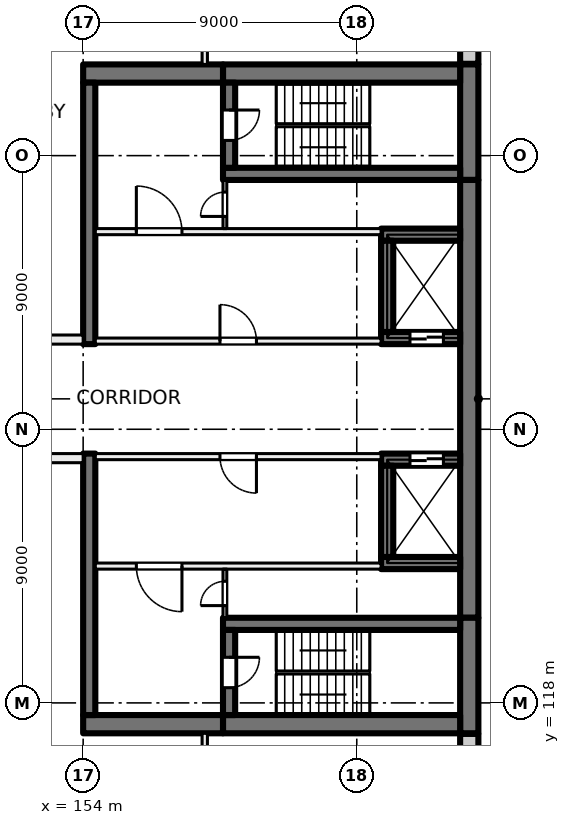
"""IFC4 building model, lengths in metres.
Left out: names, types, materials, properties, quantities, classifications, styles, units other than length and angle.
Written with IfcOpenShell. Run it as: python <this file> out.ifc"""

import sys

from ifc_helpers import new_model, si_unit, direction, frame, frame_2d, origin, place, context, subcontext, project, spatial, rectangle, extrude, element, fill, save


model = new_model("IFC4")
c1 = context("Model", 3, precision=1e-05, world=origin(), true_north=direction((0.0, 1.0)))
c2 = subcontext(c1, "Body", "Model", "MODEL_VIEW")
j1 = project(units=[si_unit("LENGTHUNIT", "METRE"), si_unit("PLANEANGLEUNIT", "RADIAN")], contexts=[c1])
p1 = place(None, origin())
s1 = spatial("IfcSite", under=j1, at=p1, CompositionType="ELEMENT")
p2 = place(p1, origin())
s2 = spatial("IfcBuilding", under=s1, at=p2, CompositionType="ELEMENT")
p3 = place(p2, frame((0.0, 0.0, 63.5)))
s3 = spatial("IfcBuildingStorey", under=s2, at=p3, CompositionType="ELEMENT", Elevation=63.5)
p4 = place(p3, frame((166.7, 139.0, 0.0), z_axis=(0.0, 0.0, 1.0), x_axis=(0.0, -1.0, 0.0)))
e1 = element("IfcWall", 1, at=p4, inside=s3, PredefinedType="SHEAR", context=c2, shape_type="SweptSolid", body=[
    extrude(rectangle(XDim=3.8, YDim=0.6, at=frame_2d((1.9, 0.0))), origin(), (0.0, 0.0, 1.0), 4.0),
])
p5 = place(p3, frame((166.7, 135.2, 0.0), z_axis=(0.0, 0.0, 1.0), x_axis=(0.0, -1.0, 0.0)))
e2 = element("IfcWall", 2, at=p5, inside=s3, PredefinedType="SHEAR", context=c2, shape_type="SweptSolid", body=[
    extrude(rectangle(XDim=14.4, YDim=0.6, at=frame_2d((7.2, 0.0))), origin(), (0.0, 0.0, 1.0), 4.0),
])
p6 = place(p3, frame((166.7, 120.8, 0.0), z_axis=(0.0, 0.0, 1.0), x_axis=(0.0, -1.0, 0.0)))
e3 = element("IfcWall", 3, at=p6, inside=s3, PredefinedType="SHEAR", context=c2, shape_type="SweptSolid", body=[
    extrude(rectangle(XDim=3.8, YDim=0.6, at=frame_2d((1.9, 0.0))), origin(), (0.0, 0.0, 1.0), 4.0),
])
for number, where, z_axis, x_axis in (
    (4, (166.4, 138.7, 0.0), (0.0, 0.0, 1.0), (-1.0, 0.0, 0.0)),
    (5, (166.4, 117.3, 0.0), (0.0, 0.0, 1.0), (-1.0, 0.0, 0.0)),
):
    element("IfcWall", number, at=place(p3, frame(where, z_axis=z_axis, x_axis=x_axis)), inside=s3, PredefinedType="SHEAR", context=c2, shape_type="SweptSolid", body=[
        extrude(rectangle(XDim=7.8, YDim=0.6, at=frame_2d((3.9, 0.0))), origin(), (0.0, 0.0, 1.0), 4.0),
    ])
for number, where, z_axis, x_axis in (
    (6, (158.6, 138.7, 0.0), (0.0, 0.0, 1.0), (-1.0, 0.0, 0.0)),
    (7, (158.6, 117.3, 0.0), (0.0, 0.0, 1.0), (-1.0, 0.0, 0.0)),
):
    element("IfcWall", number, at=place(p3, frame(where, z_axis=z_axis, x_axis=x_axis)), inside=s3, PredefinedType="SHEAR", context=c2, shape_type="SweptSolid", body=[
        extrude(rectangle(XDim=4.6, YDim=0.6, at=frame_2d((2.3, 0.0))), origin(), (0.0, 0.0, 1.0), 4.0),
    ])
p7 = place(p3, frame((166.4, 135.4, 0.0), z_axis=(0.0, 0.0, 1.0), x_axis=(-1.0, 0.0, 0.0)))
e8 = element("IfcWall", 8, at=p7, inside=s3, PredefinedType="SHEAR", context=c2, shape_type="SweptSolid", body=[
    extrude(rectangle(XDim=7.8, YDim=0.4, at=frame_2d((3.9, 0.0))), origin(), (0.0, 0.0, 1.0), 4.0),
])
p8 = place(p3, frame((158.8, 138.4, 0.0), z_axis=(0.0, 0.0, 1.0), x_axis=(0.0, -1.0, 0.0)))
e9 = element("IfcWall", 9, at=p8, inside=s3, PredefinedType="SHEAR", context=c2, shape_type="SweptSolid", body=[
    extrude(rectangle(XDim=2.8, YDim=0.4, at=frame_2d((1.4, 0.0))), origin(), (0.0, 0.0, 1.0), 4.0),
])
p9 = place(p8, frame((0.9, 0.0, 0.0)))
e10 = element("IfcOpeningElement", 10, at=p9, cuts=e9, PredefinedType="OPENING", context=c2, shape_type="SweptSolid", body=[
    extrude(rectangle(XDim=1.0, YDim=2.1, at=frame_2d((0.5, 1.05))), frame((0.0, 0.21, 0.0), z_axis=(0.0, -1.0, 0.0), x_axis=(1.0, 0.0, 0.0)), (0.0, 0.0, 1.0), 0.42),
])
p10 = place(p3, frame((166.4, 120.6, 0.0), z_axis=(0.0, 0.0, 1.0), x_axis=(-1.0, 0.0, 0.0)))
e11 = element("IfcWall", 11, at=p10, inside=s3, PredefinedType="SHEAR", context=c2, shape_type="SweptSolid", body=[
    extrude(rectangle(XDim=7.8, YDim=0.4, at=frame_2d((3.9, 0.0))), origin(), (0.0, 0.0, 1.0), 4.0),
])
p11 = place(p3, frame((158.8, 120.4, 0.0), z_axis=(0.0, 0.0, 1.0), x_axis=(0.0, -1.0, 0.0)))
e12 = element("IfcWall", 12, at=p11, inside=s3, PredefinedType="SHEAR", context=c2, shape_type="SweptSolid", body=[
    extrude(rectangle(XDim=2.8, YDim=0.4, at=frame_2d((1.4, 0.0))), origin(), (0.0, 0.0, 1.0), 4.0),
])
p12 = place(p11, frame((0.9, 0.0, 0.0)))
e13 = element("IfcOpeningElement", 13, at=p12, cuts=e12, PredefinedType="OPENING", context=c2, shape_type="SweptSolid", body=[
    extrude(rectangle(XDim=1.0, YDim=2.1, at=frame_2d((0.5, 1.05))), frame((0.0, 0.21, 0.0), z_axis=(0.0, -1.0, 0.0), x_axis=(1.0, 0.0, 0.0)), (0.0, 0.0, 1.0), 0.42),
])
p13 = place(p3, frame((166.4, 130.0, 0.0), z_axis=(0.0, 0.0, 1.0), x_axis=(-1.0, 0.0, 0.0)))
e14 = element("IfcWall", 14, at=p13, inside=s3, PredefinedType="SHEAR", context=c2, shape_type="SweptSolid", body=[
    extrude(rectangle(XDim=2.6, YDim=0.4, at=frame_2d((1.3, 0.0))), origin(), (0.0, 0.0, 1.0), 4.0),
])
p14 = place(p13, frame((0.55, 0.0, 0.0)))
e15 = element("IfcOpeningElement", 15, at=p14, cuts=e14, PredefinedType="OPENING", context=c2, shape_type="SweptSolid", body=[
    extrude(rectangle(XDim=1.1, YDim=2.1, at=frame_2d((0.55, 1.05))), frame((0.0, 0.21, 0.0), z_axis=(0.0, -1.0, 0.0), x_axis=(1.0, 0.0, 0.0)), (0.0, 0.0, 1.0), 0.42),
])
p15 = place(p3, frame((166.4, 133.4, 0.0), z_axis=(0.0, 0.0, 1.0), x_axis=(-1.0, 0.0, 0.0)))
e16 = element("IfcWall", 16, at=p15, inside=s3, PredefinedType="SHEAR", context=c2, shape_type="SweptSolid", body=[
    extrude(rectangle(XDim=2.6, YDim=0.4, at=frame_2d((1.3, 0.0))), origin(), (0.0, 0.0, 1.0), 4.0),
])
p16 = place(p3, frame((164.0, 133.2, 0.0), z_axis=(0.0, 0.0, 1.0), x_axis=(0.0, -1.0, 0.0)))
e17 = element("IfcWall", 17, at=p16, inside=s3, PredefinedType="SHEAR", context=c2, shape_type="SweptSolid", body=[
    extrude(rectangle(XDim=3.0, YDim=0.4, at=frame_2d((1.5, 0.0))), origin(), (0.0, 0.0, 1.0), 4.0),
])
p17 = place(p3, frame((166.4, 126.0, 0.0), z_axis=(0.0, 0.0, 1.0), x_axis=(-1.0, 0.0, 0.0)))
e18 = element("IfcWall", 18, at=p17, inside=s3, PredefinedType="SHEAR", context=c2, shape_type="SweptSolid", body=[
    extrude(rectangle(XDim=2.6, YDim=0.4, at=frame_2d((1.3, 0.0))), origin(), (0.0, 0.0, 1.0), 4.0),
])
p18 = place(p17, frame((0.55, 0.0, 0.0)))
e19 = element("IfcOpeningElement", 19, at=p18, cuts=e18, PredefinedType="OPENING", context=c2, shape_type="SweptSolid", body=[
    extrude(rectangle(XDim=1.1, YDim=2.1, at=frame_2d((0.55, 1.05))), frame((0.0, 0.21, 0.0), z_axis=(0.0, -1.0, 0.0), x_axis=(1.0, 0.0, 0.0)), (0.0, 0.0, 1.0), 0.42),
])
p19 = place(p3, frame((166.4, 122.6, 0.0), z_axis=(0.0, 0.0, 1.0), x_axis=(-1.0, 0.0, 0.0)))
e20 = element("IfcWall", 20, at=p19, inside=s3, PredefinedType="SHEAR", context=c2, shape_type="SweptSolid", body=[
    extrude(rectangle(XDim=2.6, YDim=0.4, at=frame_2d((1.3, 0.0))), origin(), (0.0, 0.0, 1.0), 4.0),
])
p20 = place(p3, frame((164.0, 125.8, 0.0), z_axis=(0.0, 0.0, 1.0), x_axis=(0.0, -1.0, 0.0)))
e21 = element("IfcWall", 21, at=p20, inside=s3, PredefinedType="SHEAR", context=c2, shape_type="SweptSolid", body=[
    extrude(rectangle(XDim=3.0, YDim=0.4, at=frame_2d((1.5, 0.0))), origin(), (0.0, 0.0, 1.0), 4.0),
])
for number, where, z_axis, x_axis in (
    (22, (154.2, 138.4, 0.0), (0.0, 0.0, 1.0), (0.0, -1.0, 0.0)),
    (23, (154.2, 126.2, 0.0), (0.0, 0.0, 1.0), (0.0, -1.0, 0.0)),
):
    element("IfcWall", number, at=place(p3, frame(where, z_axis=z_axis, x_axis=x_axis)), inside=s3, PredefinedType="SHEAR", context=c2, shape_type="SweptSolid", body=[
        extrude(rectangle(XDim=8.6, YDim=0.4, at=frame_2d((4.3, 0.0))), origin(), (0.0, 0.0, 1.0), 4.0),
    ])
p21 = place(p3, frame((166.7, 116.98, 0.0), z_axis=(0.0, 0.0, 1.0), x_axis=(0.0, -1.0, 0.0)))
e24 = element("IfcWall", 24, at=p21, inside=s3, PredefinedType="SOLIDWALL", context=c2, shape_type="SweptSolid", body=[
    extrude(rectangle(XDim=2.98, YDim=0.6, at=frame_2d((1.49, 0.0))), origin(), (0.0, 0.0, 1.0), 3.625),
])
p22 = place(p3, frame((166.7, 141.93, 0.0), z_axis=(0.0, 0.0, 1.0), x_axis=(0.0, -1.0, 0.0)))
e25 = element("IfcWall", 25, at=p22, inside=s3, PredefinedType="SOLIDWALL", context=c2, shape_type="SweptSolid", body=[
    extrude(rectangle(XDim=2.91, YDim=0.6, at=frame_2d((1.455, 0.0))), origin(), (0.0, 0.0, 1.0), 3.625),
])
p23 = place(p3, frame((163.8, 126.1, 0.0), z_axis=(0.0, 0.0, 1.0), x_axis=(-1.0, 0.0, 0.0)))
e26 = element("IfcWall", 26, at=p23, inside=s3, PredefinedType="PARTITIONING", context=c2, shape_type="SweptSolid", body=[
    extrude(rectangle(XDim=9.4, YDim=0.2, at=frame_2d((4.7, 0.0))), origin(), (0.0, 0.0, 1.0), 3.625),
])
p24 = place(p23, frame((4.1, 0.0, 0.0)))
e27 = element("IfcOpeningElement", 27, at=p24, cuts=e26, PredefinedType="OPENING", context=c2, shape_type="SweptSolid", body=[
    extrude(rectangle(XDim=1.2, YDim=2.1, at=frame_2d((0.6, 1.05))), frame((0.0, 0.11, 0.0), z_axis=(0.0, -1.0, 0.0), x_axis=(1.0, 0.0, 0.0)), (0.0, 0.0, 1.0), 0.22),
])
p25 = place(p3, frame((163.8, 122.5, 0.0), z_axis=(0.0, 0.0, 1.0), x_axis=(-1.0, 0.0, 0.0)))
e28 = element("IfcWall", 28, at=p25, inside=s3, PredefinedType="PARTITIONING", context=c2, shape_type="SweptSolid", body=[
    extrude(rectangle(XDim=9.4, YDim=0.2, at=frame_2d((4.7, 0.0))), origin(), (0.0, 0.0, 1.0), 3.625),
])
p26 = place(p25, frame((6.55, 0.0, 0.0)))
e29 = element("IfcOpeningElement", 29, at=p26, cuts=e28, PredefinedType="OPENING", context=c2, shape_type="SweptSolid", body=[
    extrude(rectangle(XDim=1.5, YDim=2.1, at=frame_2d((0.75, 1.05))), frame((0.0, 0.11, 0.0), z_axis=(0.0, -1.0, 0.0), x_axis=(1.0, 0.0, 0.0)), (0.0, 0.0, 1.0), 0.22),
])
p27 = place(p3, frame((158.663, 120.8, 0.0), z_axis=(0.0, 0.0, 1.0), x_axis=(0.0, 1.0, 0.0)))
e30 = element("IfcWall", 30, at=p27, inside=s3, PredefinedType="PARTITIONING", context=c2, shape_type="SweptSolid", body=[
    extrude(rectangle(XDim=1.6, YDim=0.125, at=frame_2d((0.8, 0.0))), origin(), (0.0, 0.0, 1.0), 3.625),
])
p28 = place(p27, frame((0.4, 0.0, 0.0)))
e31 = element("IfcOpeningElement", 31, at=p28, cuts=e30, PredefinedType="OPENING", context=c2, shape_type="SweptSolid", body=[
    extrude(rectangle(XDim=0.8, YDim=2.1, at=frame_2d((0.4, 1.05))), frame((0.0, 0.073, 0.0), z_axis=(0.0, -1.0, 0.0), x_axis=(1.0, 0.0, 0.0)), (0.0, 0.0, 1.0), 0.145),
])
p29 = place(p3, frame((154.4, 129.9, 0.0), z_axis=(0.0, 0.0, 1.0), x_axis=(1.0, 0.0, 0.0)))
e32 = element("IfcWall", 32, at=p29, inside=s3, PredefinedType="PARTITIONING", context=c2, shape_type="SweptSolid", body=[
    extrude(rectangle(XDim=9.4, YDim=0.2, at=frame_2d((4.7, 0.0))), origin(), (0.0, 0.0, 1.0), 3.625),
])
p30 = place(p29, frame((4.1, 0.0, 0.0)))
e33 = element("IfcOpeningElement", 33, at=p30, cuts=e32, PredefinedType="OPENING", context=c2, shape_type="SweptSolid", body=[
    extrude(rectangle(XDim=1.2, YDim=2.1, at=frame_2d((0.6, 1.05))), frame((0.0, 0.11, 0.0), z_axis=(0.0, -1.0, 0.0), x_axis=(1.0, 0.0, 0.0)), (0.0, 0.0, 1.0), 0.22),
])
p31 = place(p3, frame((154.4, 133.5, 0.0), z_axis=(0.0, 0.0, 1.0), x_axis=(1.0, 0.0, 0.0)))
e34 = element("IfcWall", 34, at=p31, inside=s3, PredefinedType="PARTITIONING", context=c2, shape_type="SweptSolid", body=[
    extrude(rectangle(XDim=9.4, YDim=0.2, at=frame_2d((4.7, 0.0))), origin(), (0.0, 0.0, 1.0), 3.625),
])
p32 = place(p31, frame((1.35, 0.0, 0.0)))
e35 = element("IfcOpeningElement", 35, at=p32, cuts=e34, PredefinedType="OPENING", context=c2, shape_type="SweptSolid", body=[
    extrude(rectangle(XDim=1.5, YDim=2.1, at=frame_2d((0.75, 1.05))), frame((0.0, 0.11, 0.0), z_axis=(0.0, -1.0, 0.0), x_axis=(1.0, 0.0, 0.0)), (0.0, 0.0, 1.0), 0.22),
])
p33 = place(p3, frame((158.663, 133.6, 0.0), z_axis=(0.0, 0.0, 1.0), x_axis=(0.0, 1.0, 0.0)))
e36 = element("IfcWall", 36, at=p33, inside=s3, PredefinedType="PARTITIONING", context=c2, shape_type="SweptSolid", body=[
    extrude(rectangle(XDim=1.6, YDim=0.125, at=frame_2d((0.8, 0.0))), origin(), (0.0, 0.0, 1.0), 3.625),
])
p34 = place(p33, frame((0.4, 0.0, 0.0)))
e37 = element("IfcOpeningElement", 37, at=p34, cuts=e36, PredefinedType="OPENING", context=c2, shape_type="SweptSolid", body=[
    extrude(rectangle(XDim=0.8, YDim=2.1, at=frame_2d((0.4, 1.05))), frame((0.0, 0.073, 0.0), z_axis=(0.0, -1.0, 0.0), x_axis=(1.0, 0.0, 0.0)), (0.0, 0.0, 1.0), 0.145),
])
p35 = place(p3, frame((140.0, 129.95, 0.0), z_axis=(0.0, 0.0, 1.0), x_axis=(1.0, 0.0, 0.0)))
e38 = element("IfcWall", 38, at=p35, inside=s3, PredefinedType="PARTITIONING", context=c2, shape_type="SweptSolid", body=[
    extrude(rectangle(XDim=14.0, YDim=0.3, at=frame_2d((7.0, 0.0))), origin(), (0.0, 0.0, 1.0), 3.625),
])
p36 = place(p35, frame((5.25, 0.0, 0.0)))
e39 = element("IfcOpeningElement", 39, at=p36, cuts=e38, PredefinedType="OPENING", context=c2, shape_type="SweptSolid", body=[
    extrude(rectangle(XDim=1.0, YDim=2.1, at=frame_2d((0.5, 1.05))), frame((0.0, 0.16, 0.0), z_axis=(0.0, -1.0, 0.0), x_axis=(1.0, 0.0, 0.0)), (0.0, 0.0, 1.0), 0.32),
])
p37 = place(p35, frame((10.6, 0.0, 0.0)))
e40 = element("IfcOpeningElement", 40, at=p37, cuts=e38, PredefinedType="OPENING", context=c2, shape_type="SweptSolid", body=[
    extrude(rectangle(XDim=1.8, YDim=2.1, at=frame_2d((0.9, 1.05))), frame((0.0, 0.16, 0.0), z_axis=(0.0, -1.0, 0.0), x_axis=(1.0, 0.0, 0.0)), (0.0, 0.0, 1.0), 0.32),
])
p38 = place(p3, frame((154.0, 126.05, 0.0), z_axis=(0.0, 0.0, 1.0), x_axis=(-1.0, 0.0, 0.0)))
e41 = element("IfcWall", 41, at=p38, inside=s3, PredefinedType="PARTITIONING", context=c2, shape_type="SweptSolid", body=[
    extrude(rectangle(XDim=14.0, YDim=0.3, at=frame_2d((7.0, 0.0))), origin(), (0.0, 0.0, 1.0), 3.625),
])
p39 = place(p38, frame((6.1, 0.0, 0.0)))
e42 = element("IfcOpeningElement", 42, at=p39, cuts=e41, PredefinedType="OPENING", context=c2, shape_type="SweptSolid", body=[
    extrude(rectangle(XDim=1.8, YDim=2.1, at=frame_2d((0.9, 1.05))), frame((0.0, 0.16, 0.0), z_axis=(0.0, -1.0, 0.0), x_axis=(1.0, 0.0, 0.0)), (0.0, 0.0, 1.0), 0.32),
])
p40 = place(p3, frame((158.0, 110.6, 0.0), z_axis=(0.0, 0.0, 1.0), x_axis=(0.0, 1.0, 0.0)))
e43 = element("IfcWall", 43, at=p40, inside=s3, PredefinedType="PARTITIONING", context=c2, shape_type="SweptSolid", body=[
    extrude(rectangle(XDim=6.4, YDim=0.175, at=frame_2d((3.2, 0.0))), origin(), (0.0, 0.0, 1.0), 3.625),
])
p41 = place(p40, frame((2.6, 0.0, 0.0)))
e44 = element("IfcOpeningElement", 44, at=p41, cuts=e43, PredefinedType="OPENING", context=c2, shape_type="SweptSolid", body=[
    extrude(rectangle(XDim=1.2, YDim=2.1, at=frame_2d((0.6, 1.05))), frame((0.0, 0.097, 0.0), z_axis=(0.0, -1.0, 0.0), x_axis=(1.0, 0.0, 0.0)), (0.0, 0.0, 1.0), 0.195),
])
p42 = place(p3, frame((158.0, 139.0, 0.0), z_axis=(0.0, 0.0, 1.0), x_axis=(0.0, 1.0, 0.0)))
e45 = element("IfcWall", 45, at=p42, inside=s3, PredefinedType="PARTITIONING", context=c2, shape_type="SweptSolid", body=[
    extrude(rectangle(XDim=6.4, YDim=0.175, at=frame_2d((3.2, 0.0))), origin(), (0.0, 0.0, 1.0), 3.625),
])
p43 = place(p42, frame((2.6, 0.0, 0.0)))
e46 = element("IfcOpeningElement", 46, at=p43, cuts=e45, PredefinedType="OPENING", context=c2, shape_type="SweptSolid", body=[
    extrude(rectangle(XDim=1.2, YDim=2.1, at=frame_2d((0.6, 1.05))), frame((0.0, 0.097, 0.0), z_axis=(0.0, -1.0, 0.0), x_axis=(1.0, 0.0, 0.0)), (0.0, 0.0, 1.0), 0.195),
])
p44 = place(p18, origin())
e47 = element("IfcDoor", 47, at=p44, inside=s3, OperationType="DOUBLE_DOOR_SLIDING", PredefinedType="DOOR", context=c2, shape_type="SweptSolid", body=[
    extrude(rectangle(XDim=1.1, YDim=2.1, at=frame_2d((0.55, 1.05))), frame((0.0, 0.025, 0.0), z_axis=(0.0, -1.0, 0.0), x_axis=(1.0, 0.0, 0.0)), (0.0, 0.0, 1.0), 0.05),
])
fill(e19, e47)
p45 = place(p14, origin())
e48 = element("IfcDoor", 48, at=p45, inside=s3, OperationType="DOUBLE_DOOR_SLIDING", PredefinedType="DOOR", context=c2, shape_type="SweptSolid", body=[
    extrude(rectangle(XDim=1.1, YDim=2.1, at=frame_2d((0.55, 1.05))), frame((0.0, 0.025, 0.0), z_axis=(0.0, -1.0, 0.0), x_axis=(1.0, 0.0, 0.0)), (0.0, 0.0, 1.0), 0.05),
])
fill(e15, e48)
p46 = place(p24, origin())
e49 = element("IfcDoor", 49, at=p46, inside=s3, OperationType="DOUBLE_DOOR_SINGLE_SWING", PredefinedType="DOOR", context=c2, shape_type="SweptSolid", body=[
    extrude(rectangle(XDim=1.2, YDim=2.1, at=frame_2d((0.6, 1.05))), frame((0.0, 0.025, 0.0), z_axis=(0.0, -1.0, 0.0), x_axis=(1.0, 0.0, 0.0)), (0.0, 0.0, 1.0), 0.05),
])
fill(e27, e49)
p47 = place(p26, origin())
e50 = element("IfcDoor", 50, at=p47, inside=s3, OperationType="DOUBLE_DOOR_SINGLE_SWING", PredefinedType="DOOR", context=c2, shape_type="SweptSolid", body=[
    extrude(rectangle(XDim=1.5, YDim=2.1, at=frame_2d((0.75, 1.05))), frame((0.0, 0.025, 0.0), z_axis=(0.0, -1.0, 0.0), x_axis=(1.0, 0.0, 0.0)), (0.0, 0.0, 1.0), 0.05),
])
fill(e29, e50)
p48 = place(p12, origin())
e51 = element("IfcDoor", 51, at=p48, inside=s3, OperationType="SINGLE_SWING_LEFT", PredefinedType="DOOR", context=c2, shape_type="SweptSolid", body=[
    extrude(rectangle(XDim=1.0, YDim=2.1, at=frame_2d((0.5, 1.05))), frame((0.0, 0.025, 0.0), z_axis=(0.0, -1.0, 0.0), x_axis=(1.0, 0.0, 0.0)), (0.0, 0.0, 1.0), 0.05),
])
fill(e13, e51)
p49 = place(p28, origin())
e52 = element("IfcDoor", 52, at=p49, inside=s3, OperationType="SINGLE_SWING_RIGHT", PredefinedType="DOOR", context=c2, shape_type="SweptSolid", body=[
    extrude(rectangle(XDim=0.8, YDim=2.1, at=frame_2d((0.4, 1.05))), frame((0.0, 0.025, 0.0), z_axis=(0.0, -1.0, 0.0), x_axis=(1.0, 0.0, 0.0)), (0.0, 0.0, 1.0), 0.05),
])
fill(e31, e52)
p50 = place(p30, origin())
e53 = element("IfcDoor", 53, at=p50, inside=s3, OperationType="DOUBLE_DOOR_SINGLE_SWING", PredefinedType="DOOR", context=c2, shape_type="SweptSolid", body=[
    extrude(rectangle(XDim=1.2, YDim=2.1, at=frame_2d((0.6, 1.05))), frame((0.0, 0.025, 0.0), z_axis=(0.0, -1.0, 0.0), x_axis=(1.0, 0.0, 0.0)), (0.0, 0.0, 1.0), 0.05),
])
fill(e33, e53)
p51 = place(p32, origin())
e54 = element("IfcDoor", 54, at=p51, inside=s3, OperationType="DOUBLE_DOOR_SINGLE_SWING", PredefinedType="DOOR", context=c2, shape_type="SweptSolid", body=[
    extrude(rectangle(XDim=1.5, YDim=2.1, at=frame_2d((0.75, 1.05))), frame((0.0, 0.025, 0.0), z_axis=(0.0, -1.0, 0.0), x_axis=(1.0, 0.0, 0.0)), (0.0, 0.0, 1.0), 0.05),
])
fill(e35, e54)
p52 = place(p9, origin())
e55 = element("IfcDoor", 55, at=p52, inside=s3, OperationType="SINGLE_SWING_RIGHT", PredefinedType="DOOR", context=c2, shape_type="SweptSolid", body=[
    extrude(rectangle(XDim=1.0, YDim=2.1, at=frame_2d((0.5, 1.05))), frame((0.0, 0.025, 0.0), z_axis=(0.0, -1.0, 0.0), x_axis=(1.0, 0.0, 0.0)), (0.0, 0.0, 1.0), 0.05),
])
fill(e10, e55)
p53 = place(p34, origin())
e56 = element("IfcDoor", 56, at=p53, inside=s3, OperationType="SINGLE_SWING_LEFT", PredefinedType="DOOR", context=c2, shape_type="SweptSolid", body=[
    extrude(rectangle(XDim=0.8, YDim=2.1, at=frame_2d((0.4, 1.05))), frame((0.0, 0.025, 0.0), z_axis=(0.0, -1.0, 0.0), x_axis=(1.0, 0.0, 0.0)), (0.0, 0.0, 1.0), 0.05),
])
fill(e37, e56)
save(model, sys.argv[1])
